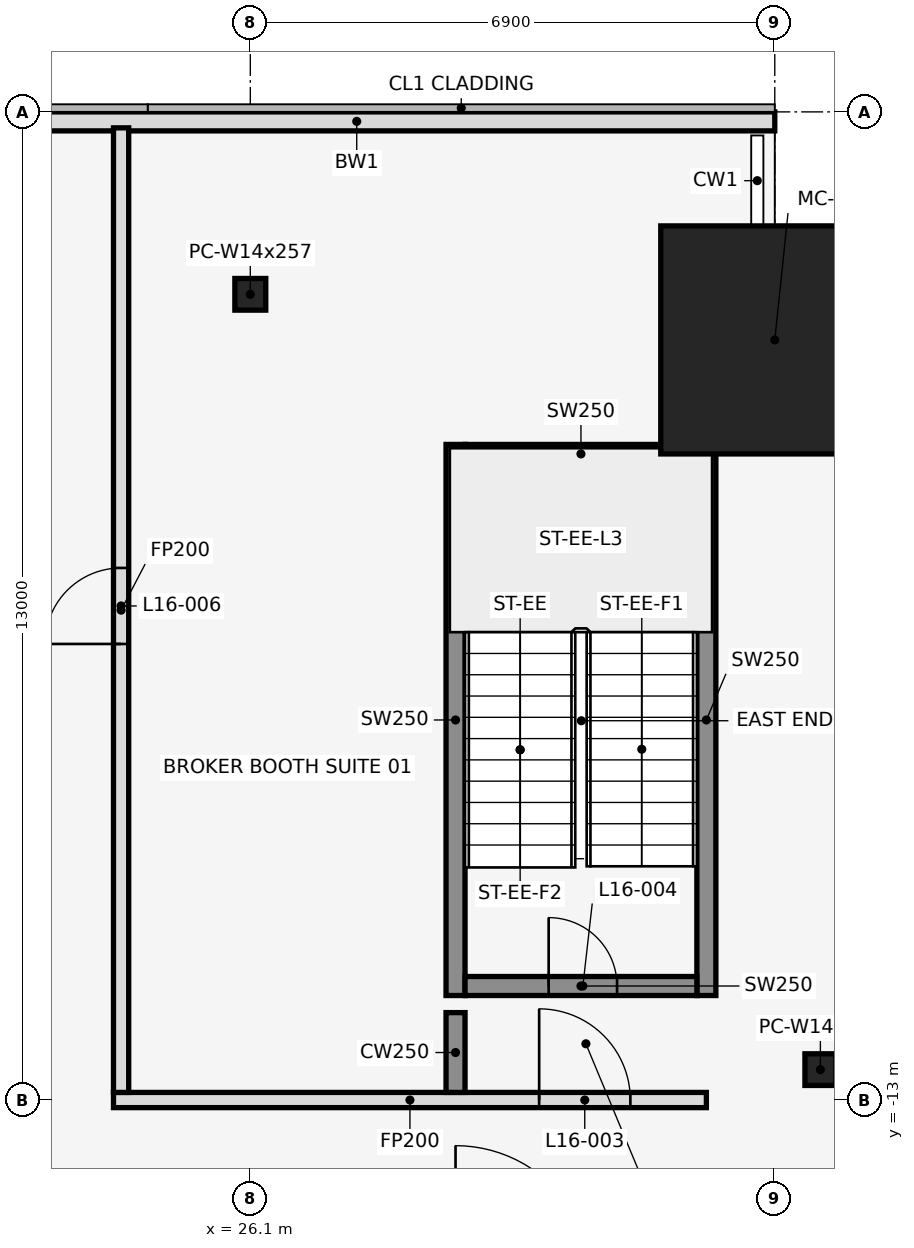
"""IFC4 building model, lengths in metres.
Left out: names, types, materials, properties, quantities, classifications, styles, units other than length and angle.
Written with IfcOpenShell. Run it as: python <this file> out.ifc"""

import sys

from ifc_helpers import new_model, si_unit, direction, frame, frame_2d, origin, origin_2d, place, context, subcontext, project, spatial, rectangle, hollow_rectangle, i_section, extrude, element, fill, save


model = new_model("IFC4")
c1 = context("Model", 3, precision=1e-05, world=origin(), true_north=direction((0.0, 1.0)))
c2 = subcontext(c1, "Body", "Model", "MODEL_VIEW")
j1 = project(units=[si_unit("LENGTHUNIT", "METRE"), si_unit("PLANEANGLEUNIT", "RADIAN")], contexts=[c1])
p1 = place(None, origin())
s1 = spatial("IfcSite", under=j1, at=p1, CompositionType="ELEMENT")
p2 = place(p1, origin())
s2 = spatial("IfcBuilding", under=s1, at=p2, CompositionType="ELEMENT")
p3 = place(p2, frame((0.0, 0.0, 80.0)))
s3 = spatial("IfcBuildingStorey", under=s2, at=p3, CompositionType="ELEMENT", Elevation=80.0)
p4 = place(p3, frame((26.1, -2.4, 0.0), z_axis=(0.0, 0.0, 1.0), x_axis=(1.0, 0.0, 0.0)))
e1 = element("IfcColumn", 1, at=p4, inside=s3, PredefinedType="COLUMN", context=c2, shape_type="SweptSolid", body=[
    extrude(i_section(OverallWidth=0.406, OverallDepth=0.417, WebThickness=0.03, FlangeThickness=0.048, at=origin_2d()), origin(), (0.0, 0.0, 1.0), 4.5),
])
p5 = place(p3, frame((33.0, -3.0, 0.0), z_axis=(0.0, 0.0, 1.0), x_axis=(1.0, 0.0, 0.0)))
e2 = element("IfcColumn", 2, at=p5, inside=s3, PredefinedType="COLUMN", context=c2, shape_type="SweptSolid", body=[
    extrude(hollow_rectangle(XDim=3.0, YDim=3.0, WallThickness=0.1, at=origin_2d()), origin(), (0.0, 0.0, 1.0), 4.5),
])
p6 = place(p3, frame((33.6, -12.6, 0.0), z_axis=(0.0, 0.0, 1.0), x_axis=(1.0, 0.0, 0.0)))
e3 = element("IfcColumn", 3, at=p6, inside=s3, PredefinedType="COLUMN", context=c2, shape_type="SweptSolid", body=[
    extrude(i_section(OverallWidth=0.406, OverallDepth=0.417, WebThickness=0.03, FlangeThickness=0.048, at=origin_2d()), origin(), (0.0, 0.0, 1.0), 4.5),
])
p7 = place(p3, frame((33.0, -0.125, 0.0), z_axis=(0.0, 0.0, 1.0), x_axis=(-1.0, 0.0, 0.0)))
e4 = element("IfcWall", 4, at=p7, inside=s3, PredefinedType="STANDARD", context=c2, shape_type="SweptSolid", body=[
    extrude(rectangle(XDim=11.0, YDim=0.25, at=frame_2d((5.5, 0.0))), origin(), (0.0, 0.0, 1.0), 4.3),
])
for number, where, z_axis, x_axis in (
    (5, (28.8, -11.625, 0.0), (0.0, 0.0, 1.0), (0.0, 1.0, 0.0)),
    (6, (32.1, -11.625, 0.0), (0.0, 0.0, 1.0), (0.0, 1.0, 0.0)),
):
    element("IfcWall", number, at=place(p3, frame(where, z_axis=z_axis, x_axis=x_axis)), inside=s3, PredefinedType="SHEAR", context=c2, shape_type="SweptSolid", body=[
        extrude(rectangle(XDim=7.25, YDim=0.25, at=frame_2d((3.625, 0.0))), origin(), (0.0, 0.0, 1.0), 4.5),
    ])
p8 = place(p3, frame((28.925, -11.5, 0.0), z_axis=(0.0, 0.0, 1.0), x_axis=(1.0, 0.0, 0.0)))
e7 = element("IfcWall", 7, at=p8, inside=s3, PredefinedType="SHEAR", context=c2, shape_type="SweptSolid", body=[
    extrude(rectangle(XDim=3.05, YDim=0.25, at=frame_2d((1.525, 0.0))), origin(), (0.0, 0.0, 1.0), 4.5),
])
p9 = place(p8, frame((1.1, 0.0, 0.0)))
e8 = element("IfcOpeningElement", 8, at=p9, cuts=e7, PredefinedType="OPENING", context=c2, shape_type="SweptSolid", body=[
    extrude(rectangle(XDim=0.9, YDim=2.1, at=frame_2d((0.45, 1.05))), frame((0.0, 0.137, 0.0), z_axis=(0.0, -1.0, 0.0), x_axis=(1.0, 0.0, 0.0)), (0.0, 0.0, 1.0), 0.274),
])
p10 = place(p3, frame((28.925, -4.5, 0.0), z_axis=(0.0, 0.0, 1.0), x_axis=(1.0, 0.0, 0.0)))
e9 = element("IfcWall", 9, at=p10, inside=s3, PredefinedType="SHEAR", context=c2, shape_type="SweptSolid", body=[
    extrude(rectangle(XDim=3.05, YDim=0.25, at=frame_2d((1.525, 0.0))), origin(), (0.0, 0.0, 1.0), 4.5),
])
p11 = place(p3, frame((24.3, -13.0, 0.0), z_axis=(0.0, 0.0, 1.0), x_axis=(1.0, 0.0, 0.0)))
e10 = element("IfcWall", 10, at=p11, inside=s3, PredefinedType="PARTITIONING", context=c2, shape_type="SweptSolid", body=[
    extrude(rectangle(XDim=7.8, YDim=0.2, at=frame_2d((3.9, 0.0))), origin(), (0.0, 0.0, 1.0), 3.368),
])
p12 = place(p11, frame((5.6, 0.0, 0.0)))
e11 = element("IfcOpeningElement", 11, at=p12, cuts=e10, PredefinedType="OPENING", context=c2, shape_type="SweptSolid", body=[
    extrude(rectangle(XDim=1.2, YDim=2.1, at=frame_2d((0.6, 1.05))), frame((0.0, 0.112, 0.0), z_axis=(0.0, -1.0, 0.0), x_axis=(1.0, 0.0, 0.0)), (0.0, 0.0, 1.0), 0.224),
])
p13 = place(p3, frame((24.4, -12.9, 0.0), z_axis=(0.0, 0.0, 1.0), x_axis=(0.0, 1.0, 0.0)))
e12 = element("IfcWall", 12, at=p13, inside=s3, PredefinedType="PARTITIONING", context=c2, shape_type="SweptSolid", body=[
    extrude(rectangle(XDim=12.69, YDim=0.2, at=frame_2d((6.345, 0.0))), origin(), (0.0, 0.0, 1.0), 3.368),
])
p14 = place(p13, frame((5.9, 0.0, 0.0)))
e13 = element("IfcOpeningElement", 13, at=p14, cuts=e12, PredefinedType="OPENING", context=c2, shape_type="SweptSolid", body=[
    extrude(rectangle(XDim=1.0, YDim=2.1, at=frame_2d((0.5, 1.05))), frame((0.0, 0.112, 0.0), z_axis=(0.0, -1.0, 0.0), x_axis=(1.0, 0.0, 0.0)), (0.0, 0.0, 1.0), 0.224),
])
p15 = place(p3, frame((28.8, -12.9, 0.0), z_axis=(0.0, 0.0, 1.0), x_axis=(0.0, 1.0, 0.0)))
e14 = element("IfcWall", 14, at=p15, inside=s3, PredefinedType="SHEAR", context=c2, shape_type="SweptSolid", body=[
    extrude(rectangle(XDim=1.05, YDim=0.25, at=frame_2d((0.525, 0.0))), origin(), (0.0, 0.0, 1.0), 4.5),
])
p16 = place(p12, origin())
e15 = element("IfcDoor", 15, at=p16, inside=s3, OperationType="SINGLE_SWING_RIGHT", PredefinedType="DOOR", context=c2, shape_type="SweptSolid", body=[
    extrude(rectangle(XDim=1.2, YDim=2.1, at=frame_2d((0.6, 1.05))), frame((0.0, 0.025, 0.0), z_axis=(0.0, -1.0, 0.0), x_axis=(1.0, 0.0, 0.0)), (0.0, 0.0, 1.0), 0.05),
])
fill(e11, e15)
p17 = place(p9, origin())
e16 = element("IfcDoor", 16, at=p17, inside=s3, OperationType="SINGLE_SWING_LEFT", PredefinedType="DOOR", context=c2, shape_type="SweptSolid", body=[
    extrude(rectangle(XDim=0.9, YDim=2.1, at=frame_2d((0.45, 1.05))), frame((0.0, 0.025, 0.0), z_axis=(0.0, -1.0, 0.0), x_axis=(1.0, 0.0, 0.0)), (0.0, 0.0, 1.0), 0.05),
])
fill(e8, e16)
p18 = place(p14, frame((1.0, 0.0, 0.0), z_axis=(0.0, 0.0, 1.0), x_axis=(-1.0, 0.0, 0.0)))
e17 = element("IfcDoor", 17, at=p18, inside=s3, OperationType="SINGLE_SWING_RIGHT", PredefinedType="DOOR", context=c2, shape_type="SweptSolid", body=[
    extrude(rectangle(XDim=1.0, YDim=2.1, at=frame_2d((0.5, 1.05))), frame((0.0, 0.025, 0.0), z_axis=(0.0, -1.0, 0.0), x_axis=(1.0, 0.0, 0.0)), (0.0, 0.0, 1.0), 0.05),
])
fill(e13, e17)
save(model, sys.argv[1])
